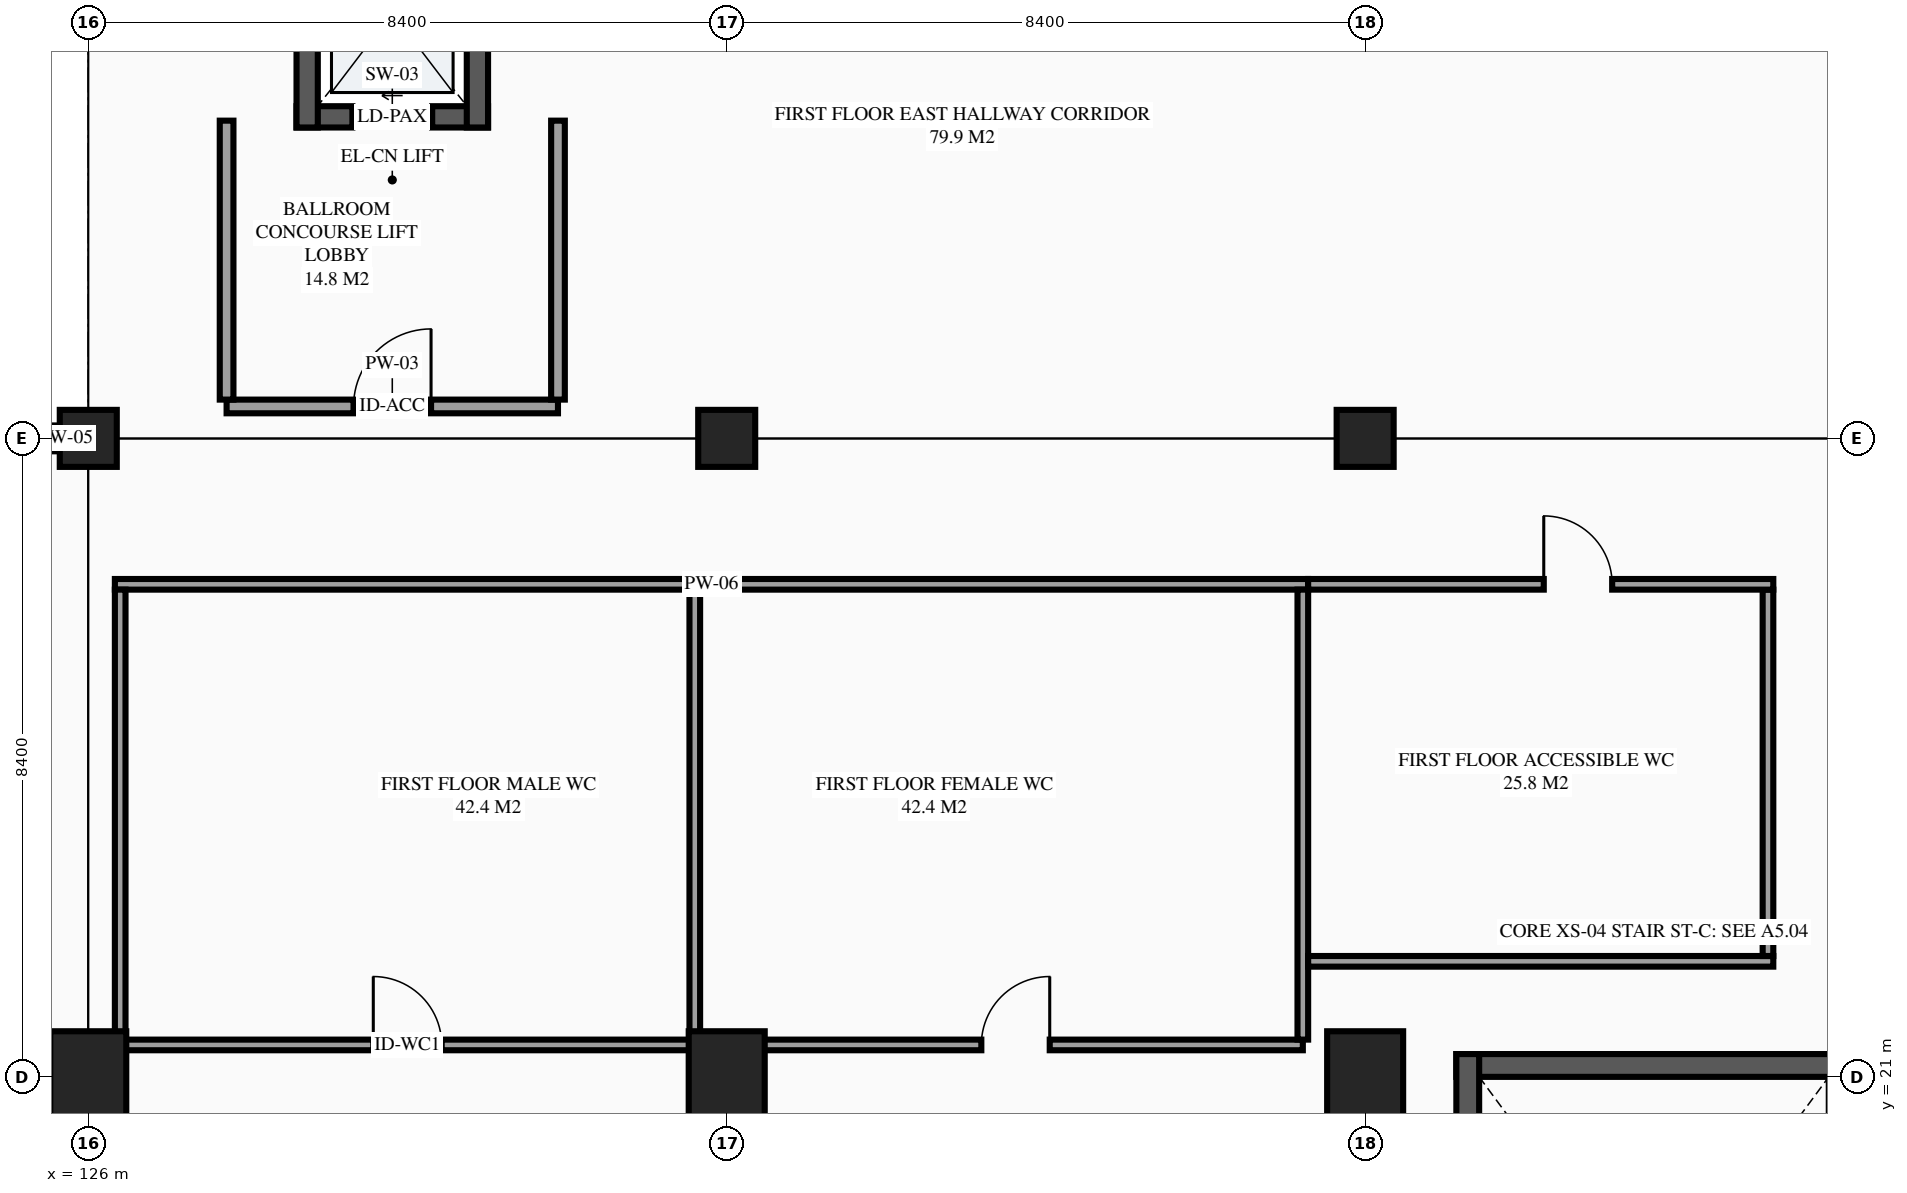
"""IFC4 building model, lengths in metres.
Left out: names, types, materials, properties, quantities, classifications, styles, units other than length and angle.
Written with IfcOpenShell. Run it as: python <this file> out.ifc"""

import sys

from ifc_helpers import new_model, si_unit, direction, frame, frame_2d, origin, origin_2d, place, context, subcontext, project, spatial, rectangle, extrude, element, fill, save


model = new_model("IFC4")
c1 = context("Model", 3, precision=1e-05, world=origin(), true_north=direction((0.0, 1.0)))
c2 = subcontext(c1, "Body", "Model", "MODEL_VIEW")
j1 = project(units=[si_unit("LENGTHUNIT", "METRE"), si_unit("PLANEANGLEUNIT", "RADIAN")], contexts=[c1])
p1 = place(None, origin())
s1 = spatial("IfcSite", under=j1, at=p1, CompositionType="ELEMENT")
p2 = place(p1, origin())
s2 = spatial("IfcBuilding", under=s1, at=p2, CompositionType="ELEMENT")
p3 = place(p2, frame((0.0, 0.0, 5.4)))
s3 = spatial("IfcBuildingStorey", under=s2, at=p3, CompositionType="ELEMENT", Elevation=5.4)
p4 = place(p3, frame((126.0, 21.0, 0.0), z_axis=(0.0, 0.0, 1.0), x_axis=(1.0, 0.0, 0.0)))
e1 = element("IfcColumn", 1, at=p4, inside=s3, PredefinedType="COLUMN", context=c2, shape_type="SweptSolid", body=[
    extrude(rectangle(XDim=1.0, YDim=1.2, at=origin_2d()), origin(), (0.0, 0.0, 1.0), 4.5),
])
p5 = place(p3, frame((126.0, 29.4, 0.0), z_axis=(0.0, 0.0, 1.0), x_axis=(1.0, 0.0, 0.0)))
e2 = element("IfcColumn", 2, at=p5, inside=s3, PredefinedType="COLUMN", context=c2, shape_type="SweptSolid", body=[
    extrude(rectangle(XDim=0.75, YDim=0.75, at=origin_2d()), origin(), (0.0, 0.0, 1.0), 4.5),
])
p6 = place(p3, frame((134.4, 21.0, 0.0), z_axis=(0.0, 0.0, 1.0), x_axis=(1.0, 0.0, 0.0)))
e3 = element("IfcColumn", 3, at=p6, inside=s3, PredefinedType="COLUMN", context=c2, shape_type="SweptSolid", body=[
    extrude(rectangle(XDim=1.0, YDim=1.2, at=origin_2d()), origin(), (0.0, 0.0, 1.0), 4.5),
])
p7 = place(p3, frame((134.4, 29.4, 0.0), z_axis=(0.0, 0.0, 1.0), x_axis=(1.0, 0.0, 0.0)))
e4 = element("IfcColumn", 4, at=p7, inside=s3, PredefinedType="COLUMN", context=c2, shape_type="SweptSolid", body=[
    extrude(rectangle(XDim=0.75, YDim=0.75, at=origin_2d()), origin(), (0.0, 0.0, 1.0), 4.5),
])
p8 = place(p3, frame((142.8, 21.0, 0.0), z_axis=(0.0, 0.0, 1.0), x_axis=(1.0, 0.0, 0.0)))
e5 = element("IfcColumn", 5, at=p8, inside=s3, PredefinedType="COLUMN", context=c2, shape_type="SweptSolid", body=[
    extrude(rectangle(XDim=1.0, YDim=1.2, at=origin_2d()), origin(), (0.0, 0.0, 1.0), 4.5),
])
p9 = place(p3, frame((142.8, 29.4, 0.0), z_axis=(0.0, 0.0, 1.0), x_axis=(1.0, 0.0, 0.0)))
e6 = element("IfcColumn", 6, at=p9, inside=s3, PredefinedType="COLUMN", context=c2, shape_type="SweptSolid", body=[
    extrude(rectangle(XDim=0.75, YDim=0.75, at=origin_2d()), origin(), (0.0, 0.0, 1.0), 4.5),
])
p10 = place(p3, frame((126.0, 29.4, 0.0), z_axis=(0.0, 0.0, 1.0), x_axis=(-1.0, 0.0, 0.0)))
e7 = element("IfcWall", 7, at=p10, inside=s3, PredefinedType="STANDARD", context=c2, shape_type="SweptSolid", body=[
    extrude(rectangle(XDim=0.6, YDim=0.34, at=frame_2d((0.3, 0.0))), origin(), (0.0, 0.0, 1.0), 4.5),
])
p11 = place(p3, frame((128.74, 33.63, 0.0), z_axis=(0.0, 0.0, 1.0), x_axis=(1.0, 0.0, 0.0)))
e8 = element("IfcWall", 8, at=p11, inside=s3, PredefinedType="SHEAR", context=c2, shape_type="SweptSolid", body=[
    extrude(rectangle(XDim=2.52, YDim=0.28, at=frame_2d((1.26, 0.0))), origin(), (0.0, 0.0, 1.0), 4.5),
])
p12 = place(p11, frame((0.735, 0.0, 0.0)))
e9 = element("IfcOpeningElement", 9, at=p12, cuts=e8, PredefinedType="OPENING", context=c2, shape_type="SweptSolid", body=[
    extrude(rectangle(XDim=1.05, YDim=2.2, at=frame_2d((0.525, 1.1))), frame((0.0, 0.15, 0.0), z_axis=(0.0, -1.0, 0.0), x_axis=(1.0, 0.0, 0.0)), (0.0, 0.0, 1.0), 0.3),
])
for number, where, z_axis, x_axis in (
    (10, (131.12, 33.49, 0.0), (0.0, 0.0, 1.0), (0.0, 1.0, 0.0)),
    (11, (128.88, 36.51, 0.0), (0.0, 0.0, 1.0), (0.0, -1.0, 0.0)),
):
    element("IfcWall", number, at=place(p3, frame(where, z_axis=z_axis, x_axis=x_axis)), inside=s3, PredefinedType="SHEAR", context=c2, shape_type="SweptSolid", body=[
        extrude(rectangle(XDim=3.02, YDim=0.28, at=frame_2d((1.51, 0.0))), origin(), (0.0, 0.0, 1.0), 4.5),
    ])
p13 = place(p3, frame((149.2, 21.15, 0.0), z_axis=(0.0, 0.0, 1.0), x_axis=(-1.0, 0.0, 0.0)))
e12 = element("IfcWall", 12, at=p13, inside=s3, PredefinedType="SHEAR", context=c2, shape_type="SweptSolid", body=[
    extrude(rectangle(XDim=5.2, YDim=0.3, at=frame_2d((2.6, 0.0))), origin(), (0.0, 0.0, 1.0), 4.5),
])
p14 = place(p3, frame((144.15, 21.3, 0.0), z_axis=(0.0, 0.0, 1.0), x_axis=(0.0, -1.0, 0.0)))
e13 = element("IfcWall", 13, at=p14, inside=s3, PredefinedType="SHEAR", context=c2, shape_type="SweptSolid", body=[
    extrude(rectangle(XDim=8.84, YDim=0.3, at=frame_2d((4.42, 0.0))), origin(), (0.0, 0.0, 1.0), 4.5),
])
p15 = place(p3, frame((126.35, 27.48, 0.0), z_axis=(0.0, 0.0, 1.0), x_axis=(1.0, 0.0, 0.0)))
e14 = element("IfcWall", 14, at=p15, inside=s3, PredefinedType="PARTITIONING", context=c2, shape_type="SweptSolid", body=[
    extrude(rectangle(XDim=15.7, YDim=0.14, at=frame_2d((7.85, 0.0))), origin(), (0.0, 0.0, 1.0), 4.235),
])
p16 = place(p3, frame((127.82, 29.82, 0.0), z_axis=(0.0, 0.0, 1.0), x_axis=(1.0, 0.0, 0.0)))
e15 = element("IfcWall", 15, at=p16, inside=s3, PredefinedType="PARTITIONING", context=c2, shape_type="SweptSolid", body=[
    extrude(rectangle(XDim=4.36, YDim=0.18, at=frame_2d((2.18, 0.0))), origin(), (0.0, 0.0, 1.0), 4.235),
])
p17 = place(p16, frame((1.67, 0.0, 0.0)))
e16 = element("IfcOpeningElement", 16, at=p17, cuts=e15, PredefinedType="OPENING", context=c2, shape_type="SweptSolid", body=[
    extrude(rectangle(XDim=1.02, YDim=2.15, at=frame_2d((0.51, 1.075))), frame((0.0, 0.1, 0.0), z_axis=(0.0, -1.0, 0.0), x_axis=(1.0, 0.0, 0.0)), (0.0, 0.0, 1.0), 0.2),
])
for number, where, z_axis, x_axis in (
    (17, (127.82, 29.91, 0.0), (0.0, 0.0, 1.0), (0.0, 1.0, 0.0)),
    (18, (132.18, 29.91, 0.0), (0.0, 0.0, 1.0), (0.0, 1.0, 0.0)),
):
    element("IfcWall", number, at=place(p3, frame(where, z_axis=z_axis, x_axis=x_axis)), inside=s3, PredefinedType="PARTITIONING", context=c2, shape_type="SweptSolid", body=[
        extrude(rectangle(XDim=3.67, YDim=0.18, at=frame_2d((1.835, 0.0))), origin(), (0.0, 0.0, 1.0), 4.235),
    ])
p18 = place(p3, frame((126.42, 21.42, 0.0), z_axis=(0.0, 0.0, 1.0), x_axis=(1.0, 0.0, 0.0)))
e19 = element("IfcWall", 19, at=p18, inside=s3, PredefinedType="PARTITIONING", context=c2, shape_type="SweptSolid", body=[
    extrude(rectangle(XDim=7.56, YDim=0.14, at=frame_2d((3.78, 0.0))), origin(), (0.0, 0.0, 1.0), 4.235),
])
p19 = place(p18, frame((3.33, 0.0, 0.0)))
e20 = element("IfcOpeningElement", 20, at=p19, cuts=e19, PredefinedType="OPENING", context=c2, shape_type="SweptSolid", body=[
    extrude(rectangle(XDim=0.9, YDim=2.12, at=frame_2d((0.45, 1.06))), frame((0.0, 0.08, 0.0), z_axis=(0.0, -1.0, 0.0), x_axis=(1.0, 0.0, 0.0)), (0.0, 0.0, 1.0), 0.16),
])
for number, where, z_axis, x_axis in (
    (21, (126.42, 21.49, 0.0), (0.0, 0.0, 1.0), (0.0, 1.0, 0.0)),
    (22, (133.98, 21.49, 0.0), (0.0, 0.0, 1.0), (0.0, 1.0, 0.0)),
):
    element("IfcWall", number, at=place(p3, frame(where, z_axis=z_axis, x_axis=x_axis)), inside=s3, PredefinedType="PARTITIONING", context=c2, shape_type="SweptSolid", body=[
        extrude(rectangle(XDim=5.92, YDim=0.14, at=frame_2d((2.96, 0.0))), origin(), (0.0, 0.0, 1.0), 4.235),
    ])
p20 = place(p3, frame((134.42, 21.42, 0.0), z_axis=(0.0, 0.0, 1.0), x_axis=(1.0, 0.0, 0.0)))
e23 = element("IfcWall", 23, at=p20, inside=s3, PredefinedType="PARTITIONING", context=c2, shape_type="SweptSolid", body=[
    extrude(rectangle(XDim=7.56, YDim=0.14, at=frame_2d((3.78, 0.0))), origin(), (0.0, 0.0, 1.0), 4.235),
])
p21 = place(p20, frame((3.33, 0.0, 0.0)))
e24 = element("IfcOpeningElement", 24, at=p21, cuts=e23, PredefinedType="OPENING", context=c2, shape_type="SweptSolid", body=[
    extrude(rectangle(XDim=0.9, YDim=2.12, at=frame_2d((0.45, 1.06))), frame((0.0, 0.08, 0.0), z_axis=(0.0, -1.0, 0.0), x_axis=(1.0, 0.0, 0.0)), (0.0, 0.0, 1.0), 0.16),
])
p22 = place(p3, frame((141.98, 21.49, 0.0), z_axis=(0.0, 0.0, 1.0), x_axis=(0.0, 1.0, 0.0)))
e25 = element("IfcWall", 25, at=p22, inside=s3, PredefinedType="PARTITIONING", context=c2, shape_type="SweptSolid", body=[
    extrude(rectangle(XDim=5.92, YDim=0.14, at=frame_2d((2.96, 0.0))), origin(), (0.0, 0.0, 1.0), 4.235),
])
p23 = place(p3, frame((142.05, 22.52, 0.0), z_axis=(0.0, 0.0, 1.0), x_axis=(1.0, 0.0, 0.0)))
e26 = element("IfcWall", 26, at=p23, inside=s3, PredefinedType="PARTITIONING", context=c2, shape_type="SweptSolid", body=[
    extrude(rectangle(XDim=6.12, YDim=0.14, at=frame_2d((3.06, 0.0))), origin(), (0.0, 0.0, 1.0), 4.235),
])
p24 = place(p3, frame((148.1, 22.59, 0.0), z_axis=(0.0, 0.0, 1.0), x_axis=(0.0, 1.0, 0.0)))
e27 = element("IfcWall", 27, at=p24, inside=s3, PredefinedType="PARTITIONING", context=c2, shape_type="SweptSolid", body=[
    extrude(rectangle(XDim=4.82, YDim=0.14, at=frame_2d((2.41, 0.0))), origin(), (0.0, 0.0, 1.0), 4.235),
])
p25 = place(p3, frame((142.05, 27.48, 0.0), z_axis=(0.0, 0.0, 1.0), x_axis=(1.0, 0.0, 0.0)))
e28 = element("IfcWall", 28, at=p25, inside=s3, PredefinedType="PARTITIONING", context=c2, shape_type="SweptSolid", body=[
    extrude(rectangle(XDim=6.12, YDim=0.14, at=frame_2d((3.06, 0.0))), origin(), (0.0, 0.0, 1.0), 4.235),
])
p26 = place(p25, frame((3.1, 0.0, 0.0)))
e29 = element("IfcOpeningElement", 29, at=p26, cuts=e28, PredefinedType="OPENING", context=c2, shape_type="SweptSolid", body=[
    extrude(rectangle(XDim=0.9, YDim=2.12, at=frame_2d((0.45, 1.06))), frame((0.0, 0.08, 0.0), z_axis=(0.0, -1.0, 0.0), x_axis=(1.0, 0.0, 0.0)), (0.0, 0.0, 1.0), 0.16),
])
p27 = place(p12, origin())
e30 = element("IfcDoor", 30, at=p27, inside=s3, OperationType="SLIDING_TO_LEFT", PredefinedType="DOOR", context=c2, shape_type="SweptSolid", body=[
    extrude(rectangle(XDim=1.05, YDim=2.2, at=frame_2d((0.525, 1.1))), frame((0.0, 0.025, 0.0), z_axis=(0.0, -1.0, 0.0), x_axis=(1.0, 0.0, 0.0)), (0.0, 0.0, 1.0), 0.05),
])
fill(e9, e30)
p28 = place(p17, origin())
e31 = element("IfcDoor", 31, at=p28, inside=s3, OperationType="SINGLE_SWING_RIGHT", PredefinedType="DOOR", context=c2, shape_type="SweptSolid", body=[
    extrude(rectangle(XDim=1.02, YDim=2.15, at=frame_2d((0.51, 1.075))), frame((0.0, 0.025, 0.0), z_axis=(0.0, -1.0, 0.0), x_axis=(1.0, 0.0, 0.0)), (0.0, 0.0, 1.0), 0.05),
])
fill(e16, e31)
p29 = place(p19, origin())
e32 = element("IfcDoor", 32, at=p29, inside=s3, OperationType="SINGLE_SWING_LEFT", PredefinedType="DOOR", context=c2, shape_type="SweptSolid", body=[
    extrude(rectangle(XDim=0.9, YDim=2.12, at=frame_2d((0.45, 1.06))), frame((0.0, 0.025, 0.0), z_axis=(0.0, -1.0, 0.0), x_axis=(1.0, 0.0, 0.0)), (0.0, 0.0, 1.0), 0.05),
])
fill(e20, e32)
p30 = place(p21, origin())
e33 = element("IfcDoor", 33, at=p30, inside=s3, OperationType="SINGLE_SWING_RIGHT", PredefinedType="DOOR", context=c2, shape_type="SweptSolid", body=[
    extrude(rectangle(XDim=0.9, YDim=2.12, at=frame_2d((0.45, 1.06))), frame((0.0, 0.025, 0.0), z_axis=(0.0, -1.0, 0.0), x_axis=(1.0, 0.0, 0.0)), (0.0, 0.0, 1.0), 0.05),
])
fill(e24, e33)
p31 = place(p26, origin())
e34 = element("IfcDoor", 34, at=p31, inside=s3, OperationType="SINGLE_SWING_LEFT", PredefinedType="DOOR", context=c2, shape_type="SweptSolid", body=[
    extrude(rectangle(XDim=0.9, YDim=2.12, at=frame_2d((0.45, 1.06))), frame((0.0, 0.025, 0.0), z_axis=(0.0, -1.0, 0.0), x_axis=(1.0, 0.0, 0.0)), (0.0, 0.0, 1.0), 0.05),
])
fill(e29, e34)
save(model, sys.argv[1])
